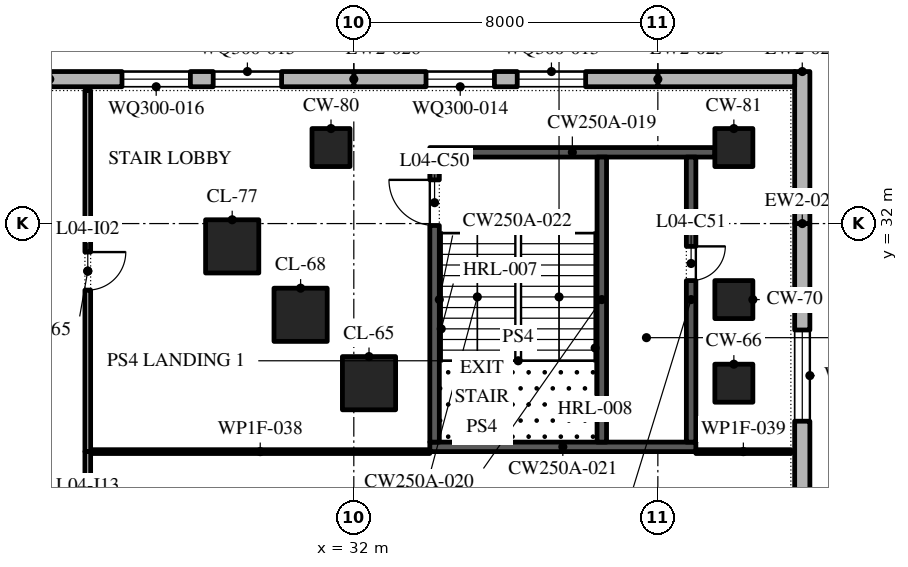
"""IFC4 building model, lengths in metres.
Left out: names, types, materials, properties, quantities, classifications, styles, units other than length and angle.
Written with IfcOpenShell. Run it as: python <this file> out.ifc"""

import sys

from ifc_helpers import new_model, si_unit, direction, frame, frame_2d, origin, origin_2d, place, context, subcontext, project, spatial, polyline, rectangle, outline, extrude, element, fill, save


model = new_model("IFC4")
c1 = context("Model", 3, precision=1e-05, world=origin(), true_north=direction((0.0, 1.0)))
c2 = subcontext(c1, "Body", "Model", "MODEL_VIEW")
j1 = project(units=[si_unit("LENGTHUNIT", "METRE"), si_unit("PLANEANGLEUNIT", "RADIAN")], contexts=[c1])
p1 = place(None, origin())
s1 = spatial("IfcSite", under=j1, at=p1, CompositionType="ELEMENT")
p2 = place(p1, origin())
s2 = spatial("IfcBuilding", under=s1, at=p2, CompositionType="ELEMENT")
p3 = place(p2, frame((0.0, 0.0, 24.0)))
s3 = spatial("IfcBuildingStorey", under=s2, at=p3, CompositionType="ELEMENT", Elevation=24.0)
p4 = place(p3, frame((32.4, 27.8, 0.0), z_axis=(0.0, 0.0, 1.0), x_axis=(1.0, 0.0, 0.0)))
e1 = element("IfcColumn", 1, at=p4, inside=s3, PredefinedType="COLUMN", context=c2, shape_type="SweptSolid", body=[
    extrude(rectangle(XDim=1.4, YDim=1.4, at=origin_2d()), origin(), (0.0, 0.0, 1.0), 4.8),
])
p5 = place(p3, frame((42.0, 27.8, 0.0), z_axis=(0.0, 0.0, 1.0), x_axis=(1.0, 0.0, 0.0)))
e2 = element("IfcColumn", 2, at=p5, inside=s3, PredefinedType="COLUMN", context=c2, shape_type="SweptSolid", body=[
    extrude(rectangle(XDim=1.0, YDim=1.0, at=origin_2d()), origin(), (0.0, 0.0, 1.0), 4.8),
])
p6 = place(p3, frame((30.6, 29.6, 0.0), z_axis=(0.0, 0.0, 1.0), x_axis=(1.0, 0.0, 0.0)))
e3 = element("IfcColumn", 3, at=p6, inside=s3, PredefinedType="COLUMN", context=c2, shape_type="SweptSolid", body=[
    extrude(rectangle(XDim=1.4, YDim=1.4, at=origin_2d()), origin(), (0.0, 0.0, 1.0), 4.8),
])
p7 = place(p3, frame((42.0, 30.0, 0.0), z_axis=(0.0, 0.0, 1.0), x_axis=(1.0, 0.0, 0.0)))
e4 = element("IfcColumn", 4, at=p7, inside=s3, PredefinedType="COLUMN", context=c2, shape_type="SweptSolid", body=[
    extrude(rectangle(XDim=1.0, YDim=1.0, at=origin_2d()), origin(), (0.0, 0.0, 1.0), 4.8),
])
p8 = place(p3, frame((28.8, 31.4, 0.0), z_axis=(0.0, 0.0, 1.0), x_axis=(1.0, 0.0, 0.0)))
e5 = element("IfcColumn", 5, at=p8, inside=s3, PredefinedType="COLUMN", context=c2, shape_type="SweptSolid", body=[
    extrude(rectangle(XDim=1.4, YDim=1.4, at=origin_2d()), origin(), (0.0, 0.0, 1.0), 4.8),
])
for number, where, z_axis, x_axis in (
    (6, (31.4, 34.0, 0.0), (0.0, 0.0, 1.0), (1.0, 0.0, 0.0)),
    (7, (42.0, 34.0, 0.0), (0.0, 0.0, 1.0), (1.0, 0.0, 0.0)),
):
    element("IfcColumn", number, at=place(p3, frame(where, z_axis=z_axis, x_axis=x_axis)), inside=s3, PredefinedType="COLUMN", context=c2, shape_type="SweptSolid", body=[
        extrude(rectangle(XDim=1.0, YDim=1.0, at=origin_2d()), origin(), (0.0, 0.0, 1.0), 4.8),
    ])
p9 = place(p3, frame((43.8, 24.0, 0.0), z_axis=(0.0, 0.0, 1.0), x_axis=(0.0, 1.0, 0.0)))
e8 = element("IfcWall", 8, at=p9, inside=s3, PredefinedType="STANDARD", context=c2, shape_type="SweptSolid", body=[
    extrude(rectangle(XDim=8.0, YDim=0.4, at=frame_2d((4.0, 0.0))), origin(), (0.0, 0.0, 1.0), 4.5),
])
p10 = place(p9, frame((2.8, 0.0, 0.9)))
e9 = element("IfcOpeningElement", 9, at=p10, cuts=e8, PredefinedType="OPENING", context=c2, shape_type="SweptSolid", body=[
    extrude(outline(polyline([(0.0, 0.0), (2.4, 0.0), (2.4, 1.5), (2.378, 1.758), (2.313, 2.009), (2.207, 2.245), (2.063, 2.46), (1.885, 2.648), (1.677, 2.804), (1.447, 2.922), (1.2, 3.0), (0.953, 2.922), (0.722, 2.804), (0.515, 2.648), (0.337, 2.46), (0.193, 2.245), (0.087, 2.009), (0.022, 1.758), (0.0, 1.5), (0.0, 0.0)])), frame((0.0, 0.21, 0.0), z_axis=(0.0, -1.0, 0.0), x_axis=(1.0, 0.0, 0.0)), (0.0, 0.0, 1.0), 0.42),
])
p11 = place(p3, frame((43.8, 32.0, 0.0), z_axis=(0.0, 0.0, 1.0), x_axis=(0.0, 1.0, 0.0)))
e10 = element("IfcWall", 10, at=p11, inside=s3, PredefinedType="STANDARD", context=c2, shape_type="SweptSolid", body=[
    extrude(rectangle(XDim=4.0, YDim=0.4, at=frame_2d((2.0, 0.0))), origin(), (0.0, 0.0, 1.0), 4.5),
])
p12 = place(p3, frame((43.6, 35.8, 0.0), z_axis=(0.0, 0.0, 1.0), x_axis=(-1.0, 0.0, 0.0)))
e11 = element("IfcWall", 11, at=p12, inside=s3, PredefinedType="STANDARD", context=c2, shape_type="SweptSolid", body=[
    extrude(rectangle(XDim=3.6, YDim=0.4, at=frame_2d((1.8, 0.0))), origin(), (0.0, 0.0, 1.0), 4.5),
])
p13 = place(p3, frame((40.0, 35.8, 0.0), z_axis=(0.0, 0.0, 1.0), x_axis=(-1.0, 0.0, 0.0)))
e12 = element("IfcWall", 12, at=p13, inside=s3, PredefinedType="STANDARD", context=c2, shape_type="SweptSolid", body=[
    extrude(rectangle(XDim=8.0, YDim=0.4, at=frame_2d((4.0, 0.0))), origin(), (0.0, 0.0, 1.0), 4.5),
])
p14 = place(p13, frame((1.9, 0.0, 0.9)))
e13 = element("IfcOpeningElement", 13, at=p14, cuts=e12, PredefinedType="OPENING", context=c2, shape_type="SweptSolid", body=[
    extrude(outline(polyline([(0.0, 0.0), (1.8, 0.0), (1.8, 1.5), (1.785, 1.729), (1.738, 1.954), (1.662, 2.17), (1.558, 2.375), (1.427, 2.563), (1.271, 2.732), (1.095, 2.879), (0.9, 3.0), (0.705, 2.879), (0.529, 2.732), (0.373, 2.563), (0.242, 2.375), (0.138, 2.17), (0.062, 1.954), (0.015, 1.729), (0.0, 1.5), (0.0, 0.0)])), frame((0.0, 0.21, 0.0), z_axis=(0.0, -1.0, 0.0), x_axis=(1.0, 0.0, 0.0)), (0.0, 0.0, 1.0), 0.42),
])
p15 = place(p13, frame((4.3, 0.0, 0.9)))
e14 = element("IfcOpeningElement", 14, at=p15, cuts=e12, PredefinedType="OPENING", context=c2, shape_type="SweptSolid", body=[
    extrude(outline(polyline([(0.0, 0.0), (1.8, 0.0), (1.8, 1.5), (1.785, 1.729), (1.738, 1.954), (1.662, 2.17), (1.558, 2.375), (1.427, 2.563), (1.271, 2.732), (1.095, 2.879), (0.9, 3.0), (0.705, 2.879), (0.529, 2.732), (0.373, 2.563), (0.242, 2.375), (0.138, 2.17), (0.062, 1.954), (0.015, 1.729), (0.0, 1.5), (0.0, 0.0)])), frame((0.0, 0.21, 0.0), z_axis=(0.0, -1.0, 0.0), x_axis=(1.0, 0.0, 0.0)), (0.0, 0.0, 1.0), 0.42),
])
p16 = place(p3, frame((32.0, 35.8, 0.0), z_axis=(0.0, 0.0, 1.0), x_axis=(-1.0, 0.0, 0.0)))
e15 = element("IfcWall", 15, at=p16, inside=s3, PredefinedType="STANDARD", context=c2, shape_type="SweptSolid", body=[
    extrude(rectangle(XDim=8.0, YDim=0.4, at=frame_2d((4.0, 0.0))), origin(), (0.0, 0.0, 1.0), 4.5),
])
p17 = place(p16, frame((1.9, 0.0, 0.9)))
e16 = element("IfcOpeningElement", 16, at=p17, cuts=e15, PredefinedType="OPENING", context=c2, shape_type="SweptSolid", body=[
    extrude(outline(polyline([(0.0, 0.0), (1.8, 0.0), (1.8, 1.5), (1.785, 1.729), (1.738, 1.954), (1.662, 2.17), (1.558, 2.375), (1.427, 2.563), (1.271, 2.732), (1.095, 2.879), (0.9, 3.0), (0.705, 2.879), (0.529, 2.732), (0.373, 2.563), (0.242, 2.375), (0.138, 2.17), (0.062, 1.954), (0.015, 1.729), (0.0, 1.5), (0.0, 0.0)])), frame((0.0, 0.21, 0.0), z_axis=(0.0, -1.0, 0.0), x_axis=(1.0, 0.0, 0.0)), (0.0, 0.0, 1.0), 0.42),
])
p18 = place(p16, frame((4.3, 0.0, 0.9)))
e17 = element("IfcOpeningElement", 17, at=p18, cuts=e15, PredefinedType="OPENING", context=c2, shape_type="SweptSolid", body=[
    extrude(outline(polyline([(0.0, 0.0), (1.8, 0.0), (1.8, 1.5), (1.785, 1.729), (1.738, 1.954), (1.662, 2.17), (1.558, 2.375), (1.427, 2.563), (1.271, 2.732), (1.095, 2.879), (0.9, 3.0), (0.705, 2.879), (0.529, 2.732), (0.373, 2.563), (0.242, 2.375), (0.138, 2.17), (0.062, 1.954), (0.015, 1.729), (0.0, 1.5), (0.0, 0.0)])), frame((0.0, 0.21, 0.0), z_axis=(0.0, -1.0, 0.0), x_axis=(1.0, 0.0, 0.0)), (0.0, 0.0, 1.0), 0.42),
])
p19 = place(p3, frame((34.0, 26.125, 0.0), z_axis=(0.0, 0.0, 1.0), x_axis=(1.0, 0.0, 0.0)))
e18 = element("IfcWall", 18, at=p19, inside=s3, PredefinedType="SHEAR", context=c2, shape_type="SweptSolid", body=[
    extrude(rectangle(XDim=7.0, YDim=0.25, at=frame_2d((3.5, 0.0))), origin(), (0.0, 0.0, 1.0), 4.5),
])
p20 = place(p3, frame((34.0, 33.875, 0.0), z_axis=(0.0, 0.0, 1.0), x_axis=(1.0, 0.0, 0.0)))
e19 = element("IfcWall", 19, at=p20, inside=s3, PredefinedType="SHEAR", context=c2, shape_type="SweptSolid", body=[
    extrude(rectangle(XDim=7.5, YDim=0.25, at=frame_2d((3.75, 0.0))), origin(), (0.0, 0.0, 1.0), 4.5),
])
p21 = place(p3, frame((34.125, 26.25, 0.0), z_axis=(0.0, 0.0, 1.0), x_axis=(0.0, 1.0, 0.0)))
e20 = element("IfcWall", 20, at=p21, inside=s3, PredefinedType="SHEAR", context=c2, shape_type="SweptSolid", body=[
    extrude(rectangle(XDim=7.5, YDim=0.25, at=frame_2d((3.75, 0.0))), origin(), (0.0, 0.0, 1.0), 4.5),
])
p22 = place(p21, frame((5.7, 0.0, 0.0)))
e21 = element("IfcOpeningElement", 21, at=p22, cuts=e20, PredefinedType="OPENING", context=c2, shape_type="SweptSolid", body=[
    extrude(rectangle(XDim=1.2, YDim=2.1, at=frame_2d((0.6, 1.05))), frame((0.0, 0.135, 0.0), z_axis=(0.0, -1.0, 0.0), x_axis=(1.0, 0.0, 0.0)), (0.0, 0.0, 1.0), 0.27),
])
p23 = place(p3, frame((40.875, 26.25, 0.0), z_axis=(0.0, 0.0, 1.0), x_axis=(0.0, 1.0, 0.0)))
e22 = element("IfcWall", 22, at=p23, inside=s3, PredefinedType="SHEAR", context=c2, shape_type="SweptSolid", body=[
    extrude(rectangle(XDim=7.5, YDim=0.25, at=frame_2d((3.75, 0.0))), origin(), (0.0, 0.0, 1.0), 4.5),
])
p24 = place(p23, frame((4.25, 0.0, 0.0)))
e23 = element("IfcOpeningElement", 23, at=p24, cuts=e22, PredefinedType="OPENING", context=c2, shape_type="SweptSolid", body=[
    extrude(rectangle(XDim=0.9, YDim=2.1, at=frame_2d((0.45, 1.05))), frame((0.0, 0.135, 0.0), z_axis=(0.0, -1.0, 0.0), x_axis=(1.0, 0.0, 0.0)), (0.0, 0.0, 1.0), 0.27),
])
p25 = place(p3, frame((38.525, 26.25, 0.0), z_axis=(0.0, 0.0, 1.0), x_axis=(0.0, 1.0, 0.0)))
e24 = element("IfcWall", 24, at=p25, inside=s3, PredefinedType="SHEAR", context=c2, shape_type="SweptSolid", body=[
    extrude(rectangle(XDim=7.5, YDim=0.25, at=frame_2d((3.75, 0.0))), origin(), (0.0, 0.0, 1.0), 4.5),
])
p26 = place(p3, frame((25.075, 26.0, 0.0), z_axis=(0.0, 0.0, 1.0), x_axis=(1.0, 0.0, 0.0)))
e25 = element("IfcWall", 25, at=p26, inside=s3, PredefinedType="PARTITIONING", context=c2, shape_type="SweptSolid", body=[
    extrude(rectangle(XDim=8.925, YDim=0.1, at=frame_2d((4.462, 0.0))), origin(), (0.0, 0.0, 1.0), 4.5),
])
p27 = place(p3, frame((41.0, 26.0, 0.0), z_axis=(0.0, 0.0, 1.0), x_axis=(1.0, 0.0, 0.0)))
e26 = element("IfcWall", 26, at=p27, inside=s3, PredefinedType="PARTITIONING", context=c2, shape_type="SweptSolid", body=[
    extrude(rectangle(XDim=2.5, YDim=0.1, at=frame_2d((1.25, 0.0))), origin(), (0.0, 0.0, 1.0), 4.5),
])
p28 = place(p3, frame((25.0, 22.0, 0.0), z_axis=(0.0, 0.0, 1.0), x_axis=(0.0, 1.0, 0.0)))
e27 = element("IfcWall", 27, at=p28, inside=s3, PredefinedType="PARTITIONING", context=c2, shape_type="SweptSolid", body=[
    extrude(rectangle(XDim=4.0, YDim=0.15, at=frame_2d((2.0, 0.0))), origin(), (0.0, 0.0, 1.0), 4.5),
])
p29 = place(p28, frame((1.5, 0.0, 0.0)))
e28 = element("IfcOpeningElement", 28, at=p29, cuts=e27, PredefinedType="OPENING", context=c2, shape_type="SweptSolid", body=[
    extrude(rectangle(XDim=1.0, YDim=2.1, at=frame_2d((0.5, 1.05))), frame((0.0, 0.085, 0.0), z_axis=(0.0, -1.0, 0.0), x_axis=(1.0, 0.0, 0.0)), (0.0, 0.0, 1.0), 0.17),
])
p30 = place(p3, frame((25.0, 26.0, 0.0), z_axis=(0.0, 0.0, 1.0), x_axis=(0.0, 1.0, 0.0)))
e29 = element("IfcWall", 29, at=p30, inside=s3, PredefinedType="PARTITIONING", context=c2, shape_type="SweptSolid", body=[
    extrude(rectangle(XDim=9.5, YDim=0.15, at=frame_2d((4.75, 0.0))), origin(), (0.0, 0.0, 1.0), 4.5),
])
p31 = place(p30, frame((4.25, 0.0, 0.0)))
e30 = element("IfcOpeningElement", 30, at=p31, cuts=e29, PredefinedType="OPENING", context=c2, shape_type="SweptSolid", body=[
    extrude(rectangle(XDim=1.0, YDim=2.1, at=frame_2d((0.5, 1.05))), frame((0.0, 0.085, 0.0), z_axis=(0.0, -1.0, 0.0), x_axis=(1.0, 0.0, 0.0)), (0.0, 0.0, 1.0), 0.17),
])
p32 = place(p10, origin())
e31 = element("IfcWindow", 31, at=p32, inside=s3, PartitioningType="DOUBLE_PANEL_VERTICAL", PredefinedType="WINDOW", context=c2, shape_type="SweptSolid", body=[
    extrude(outline(polyline([(0.0, 0.0), (2.4, 0.0), (2.4, 1.5), (2.378, 1.758), (2.313, 2.009), (2.207, 2.245), (2.063, 2.46), (1.885, 2.648), (1.677, 2.804), (1.447, 2.922), (1.2, 3.0), (0.953, 2.922), (0.722, 2.804), (0.515, 2.648), (0.337, 2.46), (0.193, 2.245), (0.087, 2.009), (0.022, 1.758), (0.0, 1.5), (0.0, 0.0)])), frame((0.0, 0.03, 0.0), z_axis=(0.0, -1.0, 0.0), x_axis=(1.0, 0.0, 0.0)), (0.0, 0.0, 1.0), 0.06),
])
fill(e9, e31)
p33 = place(p14, origin())
e32 = element("IfcWindow", 32, at=p33, inside=s3, PartitioningType="DOUBLE_PANEL_VERTICAL", PredefinedType="WINDOW", context=c2, shape_type="SweptSolid", body=[
    extrude(outline(polyline([(0.0, 0.0), (1.8, 0.0), (1.8, 1.5), (1.785, 1.729), (1.738, 1.954), (1.662, 2.17), (1.558, 2.375), (1.427, 2.563), (1.271, 2.732), (1.095, 2.879), (0.9, 3.0), (0.705, 2.879), (0.529, 2.732), (0.373, 2.563), (0.242, 2.375), (0.138, 2.17), (0.062, 1.954), (0.015, 1.729), (0.0, 1.5), (0.0, 0.0)])), frame((0.0, 0.03, 0.0), z_axis=(0.0, -1.0, 0.0), x_axis=(1.0, 0.0, 0.0)), (0.0, 0.0, 1.0), 0.06),
])
fill(e13, e32)
p34 = place(p15, origin())
e33 = element("IfcWindow", 33, at=p34, inside=s3, PartitioningType="DOUBLE_PANEL_VERTICAL", PredefinedType="WINDOW", context=c2, shape_type="SweptSolid", body=[
    extrude(outline(polyline([(0.0, 0.0), (1.8, 0.0), (1.8, 1.5), (1.785, 1.729), (1.738, 1.954), (1.662, 2.17), (1.558, 2.375), (1.427, 2.563), (1.271, 2.732), (1.095, 2.879), (0.9, 3.0), (0.705, 2.879), (0.529, 2.732), (0.373, 2.563), (0.242, 2.375), (0.138, 2.17), (0.062, 1.954), (0.015, 1.729), (0.0, 1.5), (0.0, 0.0)])), frame((0.0, 0.03, 0.0), z_axis=(0.0, -1.0, 0.0), x_axis=(1.0, 0.0, 0.0)), (0.0, 0.0, 1.0), 0.06),
])
fill(e14, e33)
p35 = place(p17, origin())
e34 = element("IfcWindow", 34, at=p35, inside=s3, PartitioningType="DOUBLE_PANEL_VERTICAL", PredefinedType="WINDOW", context=c2, shape_type="SweptSolid", body=[
    extrude(outline(polyline([(0.0, 0.0), (1.8, 0.0), (1.8, 1.5), (1.785, 1.729), (1.738, 1.954), (1.662, 2.17), (1.558, 2.375), (1.427, 2.563), (1.271, 2.732), (1.095, 2.879), (0.9, 3.0), (0.705, 2.879), (0.529, 2.732), (0.373, 2.563), (0.242, 2.375), (0.138, 2.17), (0.062, 1.954), (0.015, 1.729), (0.0, 1.5), (0.0, 0.0)])), frame((0.0, 0.03, 0.0), z_axis=(0.0, -1.0, 0.0), x_axis=(1.0, 0.0, 0.0)), (0.0, 0.0, 1.0), 0.06),
])
fill(e16, e34)
p36 = place(p18, origin())
e35 = element("IfcWindow", 35, at=p36, inside=s3, PartitioningType="DOUBLE_PANEL_VERTICAL", PredefinedType="WINDOW", context=c2, shape_type="SweptSolid", body=[
    extrude(outline(polyline([(0.0, 0.0), (1.8, 0.0), (1.8, 1.5), (1.785, 1.729), (1.738, 1.954), (1.662, 2.17), (1.558, 2.375), (1.427, 2.563), (1.271, 2.732), (1.095, 2.879), (0.9, 3.0), (0.705, 2.879), (0.529, 2.732), (0.373, 2.563), (0.242, 2.375), (0.138, 2.17), (0.062, 1.954), (0.015, 1.729), (0.0, 1.5), (0.0, 0.0)])), frame((0.0, 0.03, 0.0), z_axis=(0.0, -1.0, 0.0), x_axis=(1.0, 0.0, 0.0)), (0.0, 0.0, 1.0), 0.06),
])
fill(e17, e35)
p37 = place(p22, origin())
e36 = element("IfcDoor", 36, at=p37, inside=s3, OperationType="SINGLE_SWING_LEFT", PredefinedType="DOOR", context=c2, shape_type="SweptSolid", body=[
    extrude(rectangle(XDim=1.2, YDim=2.1, at=frame_2d((0.6, 1.05))), frame((0.0, 0.025, 0.0), z_axis=(0.0, -1.0, 0.0), x_axis=(1.0, 0.0, 0.0)), (0.0, 0.0, 1.0), 0.05),
])
fill(e21, e36)
p38 = place(p24, frame((0.9, 0.2, 0.0), z_axis=(0.0, 0.0, 1.0), x_axis=(-1.0, 0.0, 0.0)))
e37 = element("IfcDoor", 37, at=p38, inside=s3, OperationType="SINGLE_SWING_RIGHT", PredefinedType="DOOR", context=c2, shape_type="SweptSolid", body=[
    extrude(rectangle(XDim=0.9, YDim=2.1, at=frame_2d((0.45, 1.05))), frame((0.0, 0.125, 0.0), z_axis=(0.0, -1.0, 0.0), x_axis=(1.0, 0.0, 0.0)), (0.0, 0.0, 1.0), 0.05),
])
fill(e23, e37)
p39 = place(p31, frame((1.0, 0.0, 0.0), z_axis=(0.0, 0.0, 1.0), x_axis=(-1.0, 0.0, 0.0)))
e38 = element("IfcDoor", 38, at=p39, inside=s3, OperationType="SINGLE_SWING_RIGHT", PredefinedType="DOOR", context=c2, shape_type="SweptSolid", body=[
    extrude(rectangle(XDim=1.0, YDim=2.1, at=frame_2d((0.5, 1.05))), frame((0.0, 0.025, 0.0), z_axis=(0.0, -1.0, 0.0), x_axis=(1.0, 0.0, 0.0)), (0.0, 0.0, 1.0), 0.05),
])
fill(e30, e38)
save(model, sys.argv[1])
